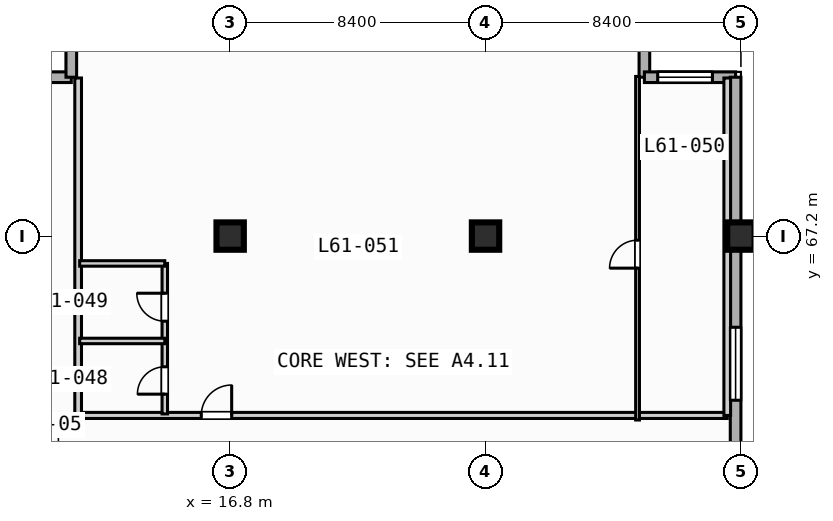
"""IFC4 building model, lengths in metres.
Left out: names, types, materials, properties, quantities, classifications, styles, units other than length and angle.
Written with IfcOpenShell. Run it as: python <this file> out.ifc"""

import sys

from ifc_helpers import new_model, si_unit, direction, frame, frame_2d, origin, origin_2d, place, context, subcontext, project, spatial, rectangle, extrude, element, fill, save


model = new_model("IFC4")
c1 = context("Model", 3, precision=1e-05, world=origin(), true_north=direction((0.0, 1.0)))
c2 = subcontext(c1, "Body", "Model", "MODEL_VIEW")
j1 = project(units=[si_unit("LENGTHUNIT", "METRE"), si_unit("PLANEANGLEUNIT", "RADIAN")], contexts=[c1])
p1 = place(None, origin())
s1 = spatial("IfcSite", under=j1, at=p1, CompositionType="ELEMENT")
p2 = place(p1, origin())
s2 = spatial("IfcBuilding", under=s1, at=p2, CompositionType="ELEMENT")
p3 = place(p2, frame((0.0, 0.0, 249.0)))
s3 = spatial("IfcBuildingStorey", under=s2, at=p3, CompositionType="ELEMENT", Elevation=249.0)
for number, where, z_axis, x_axis in (
    (1, (16.8, 67.2, 0.0), (0.0, 0.0, 1.0), (1.0, 0.0, 0.0)),
    (2, (25.2, 67.2, 0.0), (0.0, 0.0, 1.0), (1.0, 0.0, 0.0)),
    (3, (33.6, 67.2, 0.0), (0.0, 0.0, 1.0), (1.0, 0.0, 0.0)),
):
    element("IfcColumn", number, at=place(p3, frame(where, z_axis=z_axis, x_axis=x_axis)), inside=s3, PredefinedType="COLUMN", context=c2, shape_type="SweptSolid", body=[
        extrude(rectangle(XDim=0.9, YDim=0.9, at=origin_2d()), origin(), (0.0, 0.0, 1.0), 3.7),
    ])
for number, where, z_axis, x_axis in (
    (4, (8.575, 72.425, 0.0), (0.0, 0.0, 1.0), (1.0, 0.0, 0.0)),
    (5, (11.575, 72.425, 0.0), (0.0, 0.0, 1.0), (0.0, 1.0, 0.0)),
    (6, (30.425, 75.425, 0.0), (0.0, 0.0, 1.0), (0.0, -1.0, 0.0)),
):
    element("IfcWall", number, at=place(p3, frame(where, z_axis=z_axis, x_axis=x_axis)), inside=s3, PredefinedType="STANDARD", context=c2, shape_type="SweptSolid", body=[
        extrude(rectangle(XDim=3.0, YDim=0.35, at=frame_2d((1.5, 0.0))), origin(), (0.0, 0.0, 1.0), 3.47),
    ])
p4 = place(p3, frame((30.425, 72.425, 0.0), z_axis=(0.0, 0.0, 1.0), x_axis=(1.0, 0.0, 0.0)))
e7 = element("IfcWall", 7, at=p4, inside=s3, PredefinedType="STANDARD", context=c2, shape_type="SweptSolid", body=[
    extrude(rectangle(XDim=3.0, YDim=0.35, at=frame_2d((1.5, 0.0))), origin(), (0.0, 0.0, 1.0), 3.47),
])
p5 = place(p4, frame((0.438, 0.0, 0.85)))
e8 = element("IfcOpeningElement", 8, at=p5, cuts=e7, PredefinedType="OPENING", context=c2, shape_type="SweptSolid", body=[
    extrude(rectangle(XDim=1.8, YDim=1.8, at=frame_2d((0.9, 0.9))), frame((0.0, 0.185, 0.0), z_axis=(0.0, -1.0, 0.0), x_axis=(1.0, 0.0, 0.0)), (0.0, 0.0, 1.0), 0.37),
])
p6 = place(p3, frame((33.425, 72.425, 0.0), z_axis=(0.0, 0.0, 1.0), x_axis=(0.0, -1.0, 0.0)))
e9 = element("IfcWall", 9, at=p6, inside=s3, PredefinedType="STANDARD", context=c2, shape_type="SweptSolid", body=[
    extrude(rectangle(XDim=39.0, YDim=0.35, at=frame_2d((19.5, 0.0))), origin(), (0.0, 0.0, 1.0), 3.47),
])
p7 = place(p6, frame((33.725, 0.0, 0.85)))
e10 = element("IfcOpeningElement", 10, at=p7, cuts=e9, PredefinedType="OPENING", context=c2, shape_type="SweptSolid", body=[
    extrude(rectangle(XDim=1.8, YDim=1.8, at=frame_2d((0.9, 0.9))), frame((0.0, 0.185, 0.0), z_axis=(0.0, -1.0, 0.0), x_axis=(1.0, 0.0, 0.0)), (0.0, 0.0, 1.0), 0.37),
])
p8 = place(p6, frame((8.225, 0.0, 0.85)))
e11 = element("IfcOpeningElement", 11, at=p8, cuts=e9, PredefinedType="OPENING", context=c2, shape_type="SweptSolid", body=[
    extrude(rectangle(XDim=2.4, YDim=1.95, at=frame_2d((1.2, 0.975))), frame((0.0, 0.185, 0.0), z_axis=(0.0, -1.0, 0.0), x_axis=(1.0, 0.0, 0.0)), (0.0, 0.0, 1.0), 0.37),
])
p9 = place(p3, frame((11.8, 61.3, 0.0), z_axis=(0.0, 0.0, 1.0), x_axis=(1.0, 0.0, 0.0)))
e12 = element("IfcWall", 12, at=p9, inside=s3, PredefinedType="PARTITIONING", context=c2, shape_type="SweptSolid", body=[
    extrude(rectangle(XDim=21.35, YDim=0.2, at=frame_2d((10.675, 0.0))), origin(), (0.0, 0.0, 1.0), 3.47),
])
p10 = place(p9, frame((4.05, 0.0, 0.0)))
e13 = element("IfcOpeningElement", 13, at=p10, cuts=e12, PredefinedType="OPENING", context=c2, shape_type="SweptSolid", body=[
    extrude(rectangle(XDim=1.0, YDim=2.15, at=frame_2d((0.5, 1.075))), frame((0.0, 0.11, 0.0), z_axis=(0.0, -1.0, 0.0), x_axis=(1.0, 0.0, 0.0)), (0.0, 0.0, 1.0), 0.22),
])
for number, where, z_axis, x_axis in (
    (14, (33.15, 61.3, 0.0), (0.0, 0.0, 1.0), (0.0, 1.0, 0.0)),
    (15, (11.8, 61.3, 0.0), (0.0, 0.0, 1.0), (0.0, 1.0, 0.0)),
):
    element("IfcWall", number, at=place(p3, frame(where, z_axis=z_axis, x_axis=x_axis)), inside=s3, PredefinedType="PARTITIONING", context=c2, shape_type="SweptSolid", body=[
        extrude(rectangle(XDim=11.1, YDim=0.22, at=frame_2d((5.55, 0.0))), origin(), (0.0, 0.0, 1.0), 3.47),
    ])
p11 = place(p3, frame((14.65, 61.35, 0.0), z_axis=(0.0, 0.0, 1.0), x_axis=(0.0, 1.0, 0.0)))
e16 = element("IfcWall", 16, at=p11, inside=s3, PredefinedType="PLUMBINGWALL", context=c2, shape_type="SweptSolid", body=[
    extrude(rectangle(XDim=4.95, YDim=0.18, at=frame_2d((2.475, 0.0))), origin(), (0.0, 0.0, 1.0), 3.47),
])
p12 = place(p11, frame((0.65, 0.0, 0.0)))
e17 = element("IfcOpeningElement", 17, at=p12, cuts=e16, PredefinedType="OPENING", context=c2, shape_type="SweptSolid", body=[
    extrude(rectangle(XDim=0.9, YDim=2.1, at=frame_2d((0.45, 1.05))), frame((0.0, 0.1, 0.0), z_axis=(0.0, -1.0, 0.0), x_axis=(1.0, 0.0, 0.0)), (0.0, 0.0, 1.0), 0.2),
])
p13 = place(p11, frame((3.05, 0.0, 0.0)))
e18 = element("IfcOpeningElement", 18, at=p13, cuts=e16, PredefinedType="OPENING", context=c2, shape_type="SweptSolid", body=[
    extrude(rectangle(XDim=0.92, YDim=2.1, at=frame_2d((0.46, 1.05))), frame((0.0, 0.1, 0.0), z_axis=(0.0, -1.0, 0.0), x_axis=(1.0, 0.0, 0.0)), (0.0, 0.0, 1.0), 0.2),
])
for number, where, z_axis, x_axis in (
    (19, (11.85, 63.75, 0.0), (0.0, 0.0, 1.0), (1.0, 0.0, 0.0)),
    (20, (11.85, 66.3, 0.0), (0.0, 0.0, 1.0), (1.0, 0.0, 0.0)),
):
    element("IfcWall", number, at=place(p3, frame(where, z_axis=z_axis, x_axis=x_axis)), inside=s3, PredefinedType="PLUMBINGWALL", context=c2, shape_type="SweptSolid", body=[
        extrude(rectangle(XDim=2.8, YDim=0.18, at=frame_2d((1.4, 0.0))), origin(), (0.0, 0.0, 1.0), 3.47),
    ])
p14 = place(p3, frame((30.2, 61.15, 0.0), z_axis=(0.0, 0.0, 1.0), x_axis=(0.0, 1.0, 0.0)))
e21 = element("IfcWall", 21, at=p14, inside=s3, PredefinedType="PARTITIONING", context=c2, shape_type="SweptSolid", body=[
    extrude(rectangle(XDim=11.3, YDim=0.125, at=frame_2d((5.65, 0.0))), origin(), (0.0, 0.0, 1.0), 3.47),
])
p15 = place(p14, frame((4.995, 0.0, 0.0)))
e22 = element("IfcOpeningElement", 22, at=p15, cuts=e21, PredefinedType="OPENING", context=c2, shape_type="SweptSolid", body=[
    extrude(rectangle(XDim=0.92, YDim=2.1, at=frame_2d((0.46, 1.05))), frame((0.0, 0.073, 0.0), z_axis=(0.0, -1.0, 0.0), x_axis=(1.0, 0.0, 0.0)), (0.0, 0.0, 1.0), 0.145),
])
p16 = place(p5, origin())
e23 = element("IfcWindow", 23, at=p16, inside=s3, PartitioningType="SINGLE_PANEL", PredefinedType="WINDOW", context=c2, shape_type="SweptSolid", body=[
    extrude(rectangle(XDim=1.8, YDim=1.8, at=frame_2d((0.9, 0.9))), frame((0.0, 0.03, 0.0), z_axis=(0.0, -1.0, 0.0), x_axis=(1.0, 0.0, 0.0)), (0.0, 0.0, 1.0), 0.06),
])
fill(e8, e23)
p17 = place(p8, origin())
e24 = element("IfcWindow", 24, at=p17, inside=s3, PartitioningType="SINGLE_PANEL", PredefinedType="WINDOW", context=c2, shape_type="SweptSolid", body=[
    extrude(rectangle(XDim=2.4, YDim=1.95, at=frame_2d((1.2, 0.975))), frame((0.0, 0.03, 0.0), z_axis=(0.0, -1.0, 0.0), x_axis=(1.0, 0.0, 0.0)), (0.0, 0.0, 1.0), 0.06),
])
fill(e11, e24)
p18 = place(p10, origin())
e25 = element("IfcDoor", 25, at=p18, inside=s3, OperationType="SINGLE_SWING_RIGHT", PredefinedType="DOOR", context=c2, shape_type="SweptSolid", body=[
    extrude(rectangle(XDim=1.0, YDim=2.15, at=frame_2d((0.5, 1.075))), frame((0.0, 0.025, 0.0), z_axis=(0.0, -1.0, 0.0), x_axis=(1.0, 0.0, 0.0)), (0.0, 0.0, 1.0), 0.05),
])
fill(e13, e25)
p19 = place(p12, origin())
e26 = element("IfcDoor", 26, at=p19, inside=s3, OperationType="SINGLE_SWING_LEFT", PredefinedType="DOOR", context=c2, shape_type="SweptSolid", body=[
    extrude(rectangle(XDim=0.9, YDim=2.1, at=frame_2d((0.45, 1.05))), frame((0.0, 0.025, 0.0), z_axis=(0.0, -1.0, 0.0), x_axis=(1.0, 0.0, 0.0)), (0.0, 0.0, 1.0), 0.05),
])
fill(e17, e26)
p20 = place(p13, origin())
e27 = element("IfcDoor", 27, at=p20, inside=s3, OperationType="SINGLE_SWING_RIGHT", PredefinedType="DOOR", context=c2, shape_type="SweptSolid", body=[
    extrude(rectangle(XDim=0.92, YDim=2.1, at=frame_2d((0.46, 1.05))), frame((0.0, 0.025, 0.0), z_axis=(0.0, -1.0, 0.0), x_axis=(1.0, 0.0, 0.0)), (0.0, 0.0, 1.0), 0.05),
])
fill(e18, e27)
p21 = place(p15, origin())
e28 = element("IfcDoor", 28, at=p21, inside=s3, OperationType="SINGLE_SWING_LEFT", PredefinedType="DOOR", context=c2, shape_type="SweptSolid", body=[
    extrude(rectangle(XDim=0.92, YDim=2.1, at=frame_2d((0.46, 1.05))), frame((0.0, 0.025, 0.0), z_axis=(0.0, -1.0, 0.0), x_axis=(1.0, 0.0, 0.0)), (0.0, 0.0, 1.0), 0.05),
])
fill(e22, e28)
save(model, sys.argv[1])
